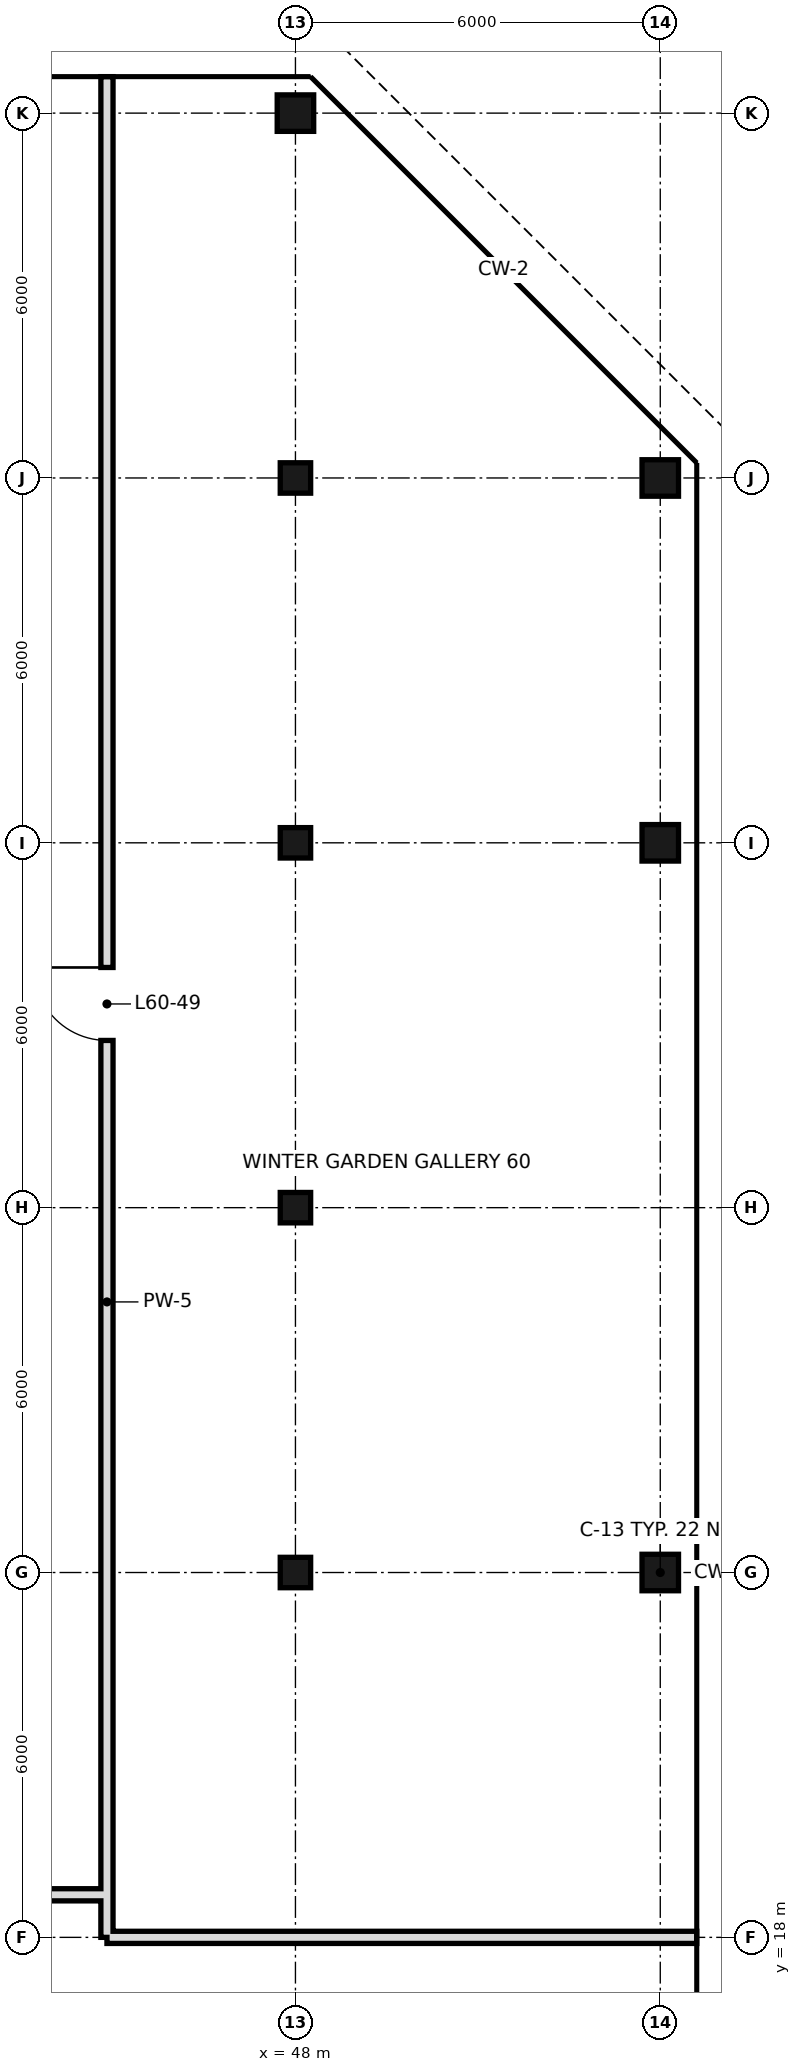
"""IFC4 building model, lengths in metres.
Left out: names, types, materials, properties, quantities, classifications, styles, units other than length and angle.
Written with IfcOpenShell. Run it as: python <this file> out.ifc"""

import sys

from ifc_helpers import new_model, si_unit, direction, frame, frame_2d, origin, origin_2d, place, context, subcontext, project, spatial, rectangle, hollow_rectangle, extrude, element, fill, save


model = new_model("IFC4")
c1 = context("Model", 3, precision=1e-05, world=origin(), true_north=direction((0.0, 1.0)))
c2 = subcontext(c1, "Body", "Model", "MODEL_VIEW")
j1 = project(units=[si_unit("LENGTHUNIT", "METRE"), si_unit("PLANEANGLEUNIT", "RADIAN")], contexts=[c1])
p1 = place(None, origin())
s1 = spatial("IfcSite", under=j1, at=p1, CompositionType="ELEMENT")
p2 = place(p1, origin())
s2 = spatial("IfcBuilding", under=s1, at=p2, CompositionType="ELEMENT")
p3 = place(p2, frame((0.0, 0.0, 254.0)))
s3 = spatial("IfcBuildingStorey", under=s2, at=p3, CompositionType="ELEMENT", Elevation=254.0)
for number, where, z_axis, x_axis in (
    (1, (48.0, 24.0, 0.0), (0.0, 0.0, 1.0), (1.0, 0.0, 0.0)),
    (2, (48.0, 30.0, 0.0), (0.0, 0.0, 1.0), (1.0, 0.0, 0.0)),
    (3, (48.0, 36.0, 0.0), (0.0, 0.0, 1.0), (1.0, 0.0, 0.0)),
    (4, (48.0, 42.0, 0.0), (0.0, 0.0, 1.0), (1.0, 0.0, 0.0)),
):
    element("IfcColumn", number, at=place(p3, frame(where, z_axis=z_axis, x_axis=x_axis)), inside=s3, PredefinedType="COLUMN", context=c2, shape_type="SweptSolid", body=[
        extrude(hollow_rectangle(XDim=0.5, YDim=0.5, WallThickness=0.025, at=origin_2d()), origin(), (0.0, 0.0, 1.0), 3.6),
    ])
for number, where, z_axis, x_axis in (
    (5, (48.0, 48.0, 0.0), (0.0, 0.0, 1.0), (1.0, 0.0, 0.0)),
    (6, (54.0, 24.0, 0.0), (0.0, 0.0, 1.0), (1.0, 0.0, 0.0)),
    (7, (54.0, 36.0, 0.0), (0.0, 0.0, 1.0), (1.0, 0.0, 0.0)),
    (8, (54.0, 42.0, 0.0), (0.0, 0.0, 1.0), (1.0, 0.0, 0.0)),
):
    element("IfcColumn", number, at=place(p3, frame(where, z_axis=z_axis, x_axis=x_axis)), inside=s3, PredefinedType="COLUMN", context=c2, shape_type="SweptSolid", body=[
        extrude(hollow_rectangle(XDim=0.6, YDim=0.6, WallThickness=0.028, at=origin_2d()), origin(), (0.0, 0.0, 1.0), 3.6),
    ])
p4 = place(p3, frame((44.9, 18.0, 0.0), z_axis=(0.0, 0.0, 1.0), x_axis=(0.0, 1.0, 0.0)))
e9 = element("IfcWall", 9, at=p4, inside=s3, PredefinedType="SOLIDWALL", context=c2, shape_type="SweptSolid", body=[
    extrude(rectangle(XDim=30.6, YDim=0.2, at=frame_2d((15.3, 0.0))), origin(), (0.0, 0.0, 1.0), 2.68),
])
p5 = place(p4, frame((14.75, 0.0, 0.0)))
e10 = element("IfcOpeningElement", 10, at=p5, cuts=e9, PredefinedType="OPENING", context=c2, shape_type="SweptSolid", body=[
    extrude(rectangle(XDim=1.2, YDim=2.4, at=frame_2d((0.6, 1.2))), frame((0.0, 0.11, 0.0), z_axis=(0.0, -1.0, 0.0), x_axis=(1.0, 0.0, 0.0)), (0.0, 0.0, 1.0), 0.22),
])
p6 = place(p3, frame((44.9, 18.0, 0.0), z_axis=(0.0, 0.0, 1.0), x_axis=(1.0, 0.0, 0.0)))
e11 = element("IfcWall", 11, at=p6, inside=s3, PredefinedType="SOLIDWALL", context=c2, shape_type="SweptSolid", body=[
    extrude(rectangle(XDim=9.7, YDim=0.2, at=frame_2d((4.85, 0.0))), origin(), (0.0, 0.0, 1.0), 2.68),
])
p7 = place(p3, frame((23.4, 18.7, 0.0), z_axis=(0.0, 0.0, 1.0), x_axis=(1.0, 0.0, 0.0)))
e12 = element("IfcWall", 12, at=p7, inside=s3, PredefinedType="SOLIDWALL", context=c2, shape_type="SweptSolid", body=[
    extrude(rectangle(XDim=21.5, YDim=0.2, at=frame_2d((10.75, 0.0))), origin(), (0.0, 0.0, 1.0), 2.68),
])
p8 = place(p7, frame((15.86, 0.0, 0.0)))
e13 = element("IfcOpeningElement", 13, at=p8, cuts=e12, PredefinedType="OPENING", context=c2, shape_type="SweptSolid", body=[
    extrude(rectangle(XDim=1.2, YDim=2.4, at=frame_2d((0.6, 1.2))), frame((0.0, 0.11, 0.0), z_axis=(0.0, -1.0, 0.0), x_axis=(1.0, 0.0, 0.0)), (0.0, 0.0, 1.0), 0.22),
])
p9 = place(p5, frame((1.2, 0.0, 0.0), z_axis=(0.0, 0.0, 1.0), x_axis=(-1.0, 0.0, 0.0)))
e14 = element("IfcDoor", 14, at=p9, inside=s3, OperationType="SINGLE_SWING_LEFT", PredefinedType="DOOR", context=c2, shape_type="SweptSolid", body=[
    extrude(rectangle(XDim=1.2, YDim=2.4, at=frame_2d((0.6, 1.2))), frame((0.0, 0.025, 0.0), z_axis=(0.0, -1.0, 0.0), x_axis=(1.0, 0.0, 0.0)), (0.0, 0.0, 1.0), 0.05),
])
fill(e10, e14)
save(model, sys.argv[1])
